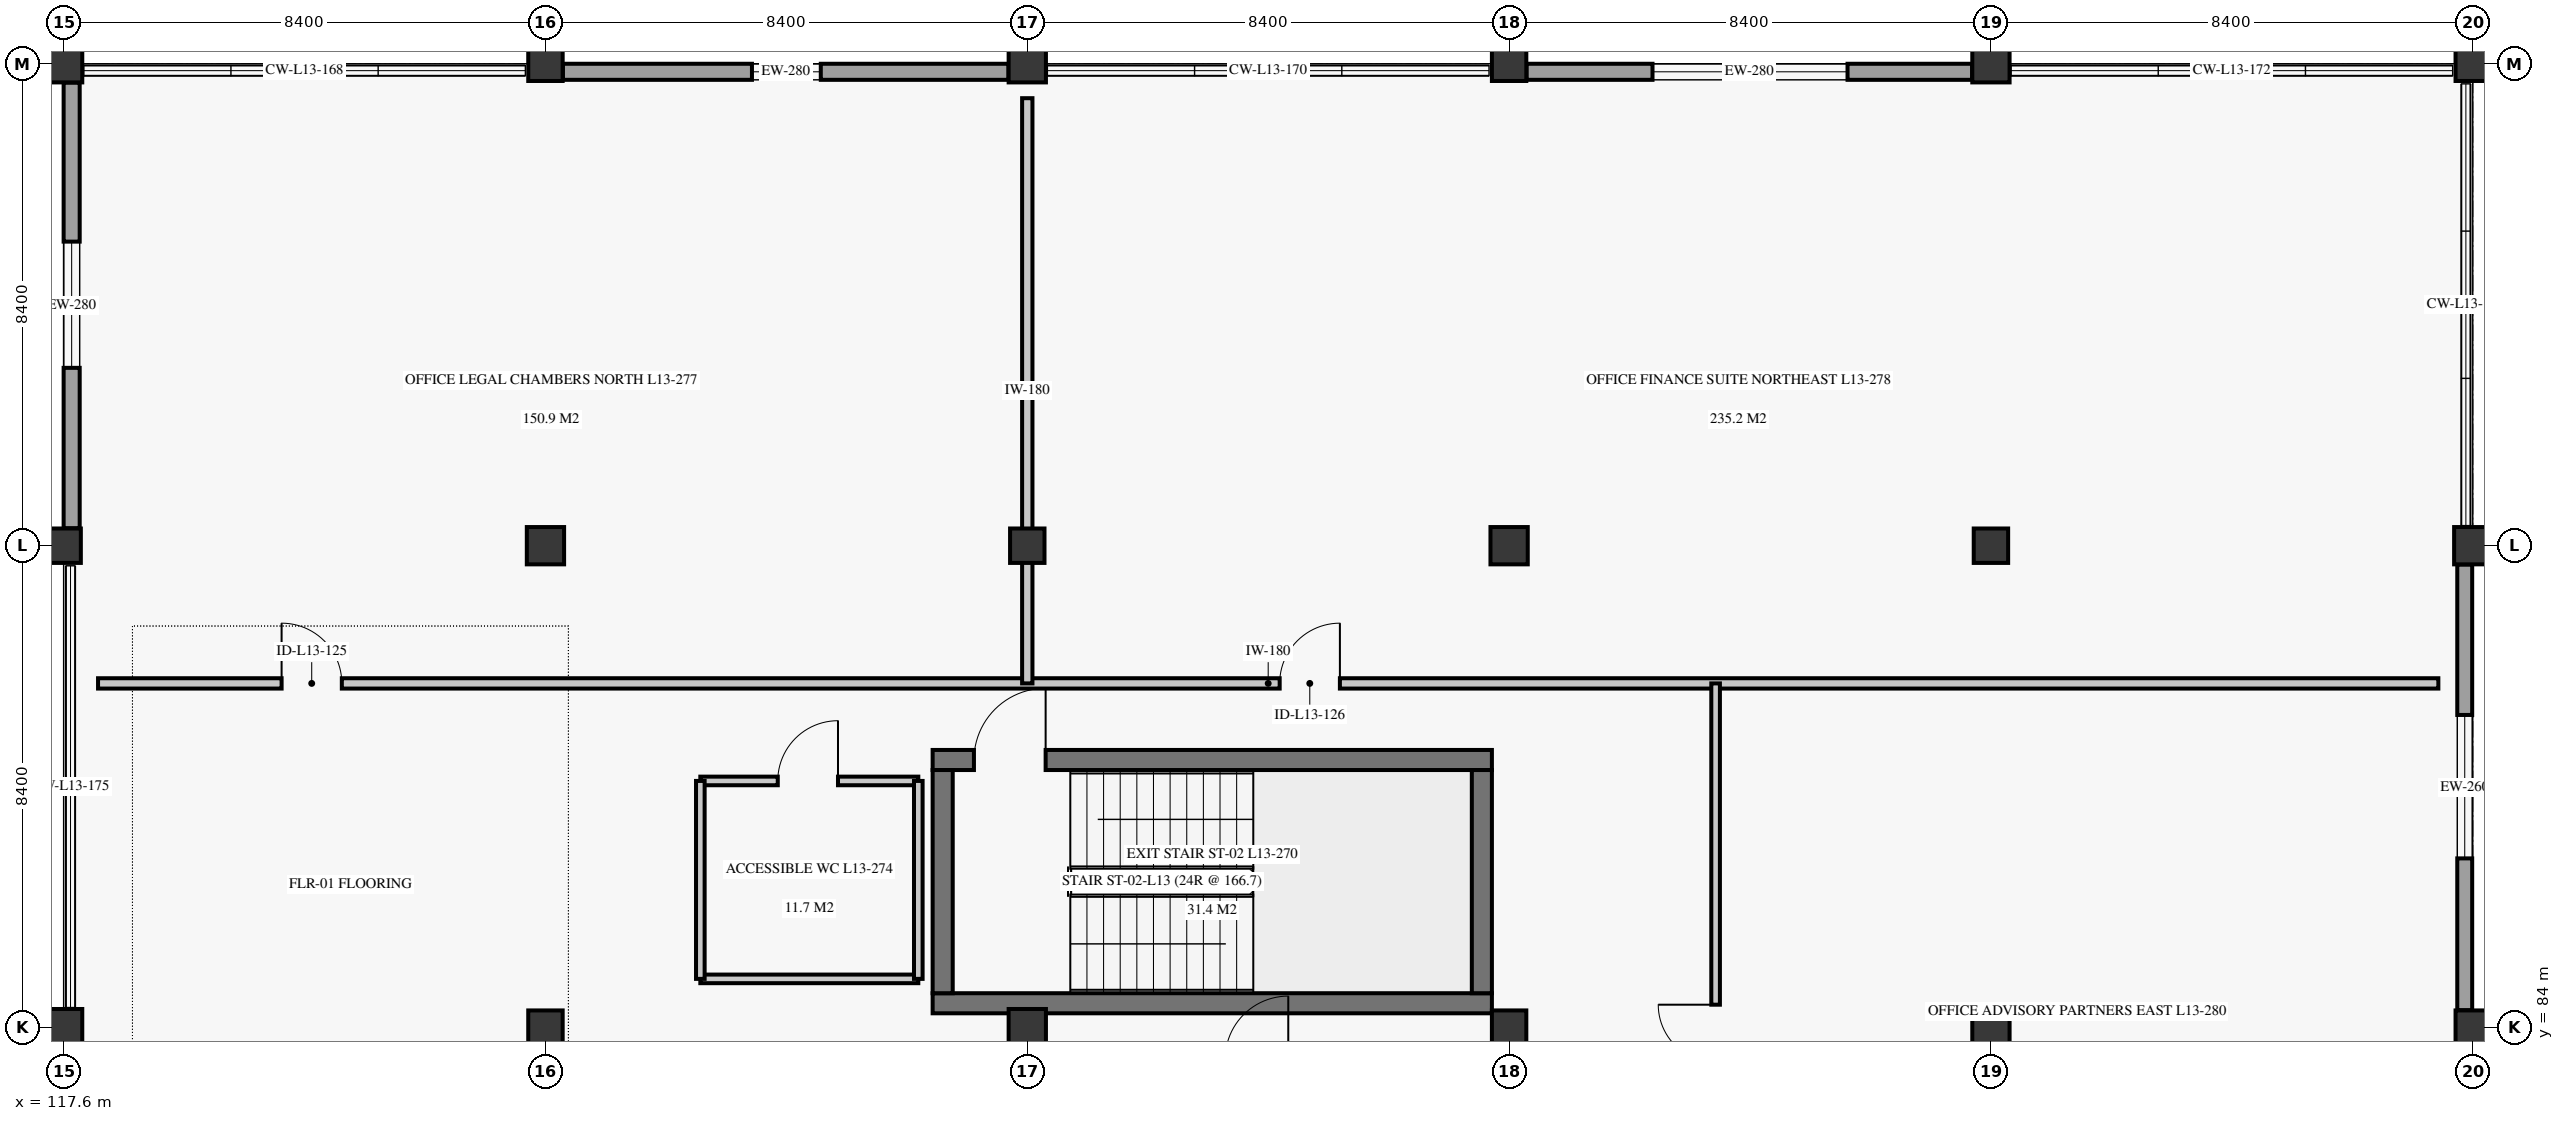
"""IFC4 building model, lengths in metres.
Left out: names, types, materials, properties, quantities, classifications, styles, units other than length and angle.
Written with IfcOpenShell. Run it as: python <this file> out.ifc"""

import sys

from ifc_helpers import new_model, si_unit, direction, frame, frame_2d, origin, origin_2d, place, context, subcontext, project, spatial, rectangle, extrude, element, fill, save


model = new_model("IFC4")
c1 = context("Model", 3, precision=1e-05, world=origin(), true_north=direction((0.0, 1.0)))
c2 = subcontext(c1, "Body", "Model", "MODEL_VIEW")
j1 = project(units=[si_unit("LENGTHUNIT", "METRE"), si_unit("PLANEANGLEUNIT", "RADIAN")], contexts=[c1])
p1 = place(None, origin())
s1 = spatial("IfcSite", under=j1, at=p1, CompositionType="ELEMENT")
p2 = place(p1, origin())
s2 = spatial("IfcBuilding", under=s1, at=p2, CompositionType="ELEMENT")
p3 = place(p2, frame((0.0, 0.0, 54.7)))
s3 = spatial("IfcBuildingStorey", under=s2, at=p3, CompositionType="ELEMENT", Elevation=54.7)
p4 = place(p3, frame((117.6, 84.0, 0.0), z_axis=(0.0, 0.0, 1.0), x_axis=(1.0, 0.0, 0.0)))
e1 = element("IfcColumn", 1, at=p4, inside=s3, PredefinedType="COLUMN", context=c2, shape_type="SweptSolid", body=[
    extrude(rectangle(XDim=0.65, YDim=0.65, at=origin_2d()), origin(), (0.0, 0.0, 1.0), 3.72),
])
p5 = place(p3, frame((117.6, 92.4, 0.0), z_axis=(0.0, 0.0, 1.0), x_axis=(1.0, 0.0, 0.0)))
e2 = element("IfcColumn", 2, at=p5, inside=s3, PredefinedType="COLUMN", context=c2, shape_type="SweptSolid", body=[
    extrude(rectangle(XDim=0.6, YDim=0.6, at=origin_2d()), origin(), (0.0, 0.0, 1.0), 3.72),
])
p6 = place(p3, frame((117.6, 100.8, 0.0), z_axis=(0.0, 0.0, 1.0), x_axis=(1.0, 0.0, 0.0)))
e3 = element("IfcColumn", 3, at=p6, inside=s3, PredefinedType="COLUMN", context=c2, shape_type="SweptSolid", body=[
    extrude(rectangle(XDim=0.65, YDim=0.65, at=origin_2d()), origin(), (0.0, 0.0, 1.0), 3.72),
])
p7 = place(p3, frame((126.0, 84.0, 0.0), z_axis=(0.0, 0.0, 1.0), x_axis=(1.0, 0.0, 0.0)))
e4 = element("IfcColumn", 4, at=p7, inside=s3, PredefinedType="COLUMN", context=c2, shape_type="SweptSolid", body=[
    extrude(rectangle(XDim=0.6, YDim=0.6, at=origin_2d()), origin(), (0.0, 0.0, 1.0), 3.72),
])
p8 = place(p3, frame((126.0, 92.4, 0.0), z_axis=(0.0, 0.0, 1.0), x_axis=(1.0, 0.0, 0.0)))
e5 = element("IfcColumn", 5, at=p8, inside=s3, PredefinedType="COLUMN", context=c2, shape_type="SweptSolid", body=[
    extrude(rectangle(XDim=0.65, YDim=0.65, at=origin_2d()), origin(), (0.0, 0.0, 1.0), 3.72),
])
p9 = place(p3, frame((126.0, 100.8, 0.0), z_axis=(0.0, 0.0, 1.0), x_axis=(1.0, 0.0, 0.0)))
e6 = element("IfcColumn", 6, at=p9, inside=s3, PredefinedType="COLUMN", context=c2, shape_type="SweptSolid", body=[
    extrude(rectangle(XDim=0.6, YDim=0.6, at=origin_2d()), origin(), (0.0, 0.0, 1.0), 3.72),
])
p10 = place(p3, frame((134.4, 84.0, 0.0), z_axis=(0.0, 0.0, 1.0), x_axis=(1.0, 0.0, 0.0)))
e7 = element("IfcColumn", 7, at=p10, inside=s3, PredefinedType="COLUMN", context=c2, shape_type="SweptSolid", body=[
    extrude(rectangle(XDim=0.65, YDim=0.65, at=origin_2d()), origin(), (0.0, 0.0, 1.0), 3.72),
])
p11 = place(p3, frame((134.4, 92.4, 0.0), z_axis=(0.0, 0.0, 1.0), x_axis=(1.0, 0.0, 0.0)))
e8 = element("IfcColumn", 8, at=p11, inside=s3, PredefinedType="COLUMN", context=c2, shape_type="SweptSolid", body=[
    extrude(rectangle(XDim=0.6, YDim=0.6, at=origin_2d()), origin(), (0.0, 0.0, 1.0), 3.72),
])
p12 = place(p3, frame((134.4, 100.8, 0.0), z_axis=(0.0, 0.0, 1.0), x_axis=(1.0, 0.0, 0.0)))
e9 = element("IfcColumn", 9, at=p12, inside=s3, PredefinedType="COLUMN", context=c2, shape_type="SweptSolid", body=[
    extrude(rectangle(XDim=0.65, YDim=0.65, at=origin_2d()), origin(), (0.0, 0.0, 1.0), 3.72),
])
p13 = place(p3, frame((142.8, 84.0, 0.0), z_axis=(0.0, 0.0, 1.0), x_axis=(1.0, 0.0, 0.0)))
e10 = element("IfcColumn", 10, at=p13, inside=s3, PredefinedType="COLUMN", context=c2, shape_type="SweptSolid", body=[
    extrude(rectangle(XDim=0.6, YDim=0.6, at=origin_2d()), origin(), (0.0, 0.0, 1.0), 3.72),
])
p14 = place(p3, frame((142.8, 92.4, 0.0), z_axis=(0.0, 0.0, 1.0), x_axis=(1.0, 0.0, 0.0)))
e11 = element("IfcColumn", 11, at=p14, inside=s3, PredefinedType="COLUMN", context=c2, shape_type="SweptSolid", body=[
    extrude(rectangle(XDim=0.65, YDim=0.65, at=origin_2d()), origin(), (0.0, 0.0, 1.0), 3.72),
])
p15 = place(p3, frame((142.8, 100.8, 0.0), z_axis=(0.0, 0.0, 1.0), x_axis=(1.0, 0.0, 0.0)))
e12 = element("IfcColumn", 12, at=p15, inside=s3, PredefinedType="COLUMN", context=c2, shape_type="SweptSolid", body=[
    extrude(rectangle(XDim=0.6, YDim=0.6, at=origin_2d()), origin(), (0.0, 0.0, 1.0), 3.72),
])
p16 = place(p3, frame((151.2, 84.0, 0.0), z_axis=(0.0, 0.0, 1.0), x_axis=(1.0, 0.0, 0.0)))
e13 = element("IfcColumn", 13, at=p16, inside=s3, PredefinedType="COLUMN", context=c2, shape_type="SweptSolid", body=[
    extrude(rectangle(XDim=0.65, YDim=0.65, at=origin_2d()), origin(), (0.0, 0.0, 1.0), 3.72),
])
p17 = place(p3, frame((151.2, 92.4, 0.0), z_axis=(0.0, 0.0, 1.0), x_axis=(1.0, 0.0, 0.0)))
e14 = element("IfcColumn", 14, at=p17, inside=s3, PredefinedType="COLUMN", context=c2, shape_type="SweptSolid", body=[
    extrude(rectangle(XDim=0.6, YDim=0.6, at=origin_2d()), origin(), (0.0, 0.0, 1.0), 3.72),
])
p18 = place(p3, frame((151.2, 100.8, 0.0), z_axis=(0.0, 0.0, 1.0), x_axis=(1.0, 0.0, 0.0)))
e15 = element("IfcColumn", 15, at=p18, inside=s3, PredefinedType="COLUMN", context=c2, shape_type="SweptSolid", body=[
    extrude(rectangle(XDim=0.65, YDim=0.65, at=origin_2d()), origin(), (0.0, 0.0, 1.0), 3.72),
])
p19 = place(p3, frame((159.6, 84.0, 0.0), z_axis=(0.0, 0.0, 1.0), x_axis=(1.0, 0.0, 0.0)))
e16 = element("IfcColumn", 16, at=p19, inside=s3, PredefinedType="COLUMN", context=c2, shape_type="SweptSolid", body=[
    extrude(rectangle(XDim=0.6, YDim=0.6, at=origin_2d()), origin(), (0.0, 0.0, 1.0), 3.72),
])
p20 = place(p3, frame((159.6, 92.4, 0.0), z_axis=(0.0, 0.0, 1.0), x_axis=(1.0, 0.0, 0.0)))
e17 = element("IfcColumn", 17, at=p20, inside=s3, PredefinedType="COLUMN", context=c2, shape_type="SweptSolid", body=[
    extrude(rectangle(XDim=0.65, YDim=0.65, at=origin_2d()), origin(), (0.0, 0.0, 1.0), 3.72),
])
p21 = place(p3, frame((159.6, 100.8, 0.0), z_axis=(0.0, 0.0, 1.0), x_axis=(1.0, 0.0, 0.0)))
e18 = element("IfcColumn", 18, at=p21, inside=s3, PredefinedType="COLUMN", context=c2, shape_type="SweptSolid", body=[
    extrude(rectangle(XDim=0.6, YDim=0.6, at=origin_2d()), origin(), (0.0, 0.0, 1.0), 3.72),
])
p22 = place(p3, frame((126.304, 100.66, 0.0), z_axis=(0.0, 0.0, 1.0), x_axis=(1.0, 0.0, 0.0)))
e19 = element("IfcWall", 19, at=p22, inside=s3, PredefinedType="SOLIDWALL", context=c2, shape_type="SweptSolid", body=[
    extrude(rectangle(XDim=7.768, YDim=0.28, at=frame_2d((3.884, 0.0))), origin(), (0.0, 0.0, 1.0), 3.04),
])
p23 = place(p22, frame((3.296, 0.0, 0.85)))
e20 = element("IfcOpeningElement", 20, at=p23, cuts=e19, PredefinedType="OPENING", context=c2, shape_type="SweptSolid", body=[
    extrude(rectangle(XDim=1.2, YDim=1.6, at=frame_2d((0.6, 0.8))), frame((0.0, 0.15, 0.0), z_axis=(0.0, -1.0, 0.0), x_axis=(1.0, 0.0, 0.0)), (0.0, 0.0, 1.0), 0.3),
])
p24 = place(p3, frame((143.104, 100.66, 0.0), z_axis=(0.0, 0.0, 1.0), x_axis=(1.0, 0.0, 0.0)))
e21 = element("IfcWall", 21, at=p24, inside=s3, PredefinedType="SOLIDWALL", context=c2, shape_type="SweptSolid", body=[
    extrude(rectangle(XDim=7.768, YDim=0.28, at=frame_2d((3.884, 0.0))), origin(), (0.0, 0.0, 1.0), 3.04),
])
p25 = place(p24, frame((2.196, 0.0, 0.85)))
e22 = element("IfcOpeningElement", 22, at=p25, cuts=e21, PredefinedType="OPENING", context=c2, shape_type="SweptSolid", body=[
    extrude(rectangle(XDim=3.4, YDim=1.9, at=frame_2d((1.7, 0.95))), frame((0.0, 0.15, 0.0), z_axis=(0.0, -1.0, 0.0), x_axis=(1.0, 0.0, 0.0)), (0.0, 0.0, 1.0), 0.3),
])
p26 = place(p3, frame((159.46, 84.304, 0.0), z_axis=(0.0, 0.0, 1.0), x_axis=(0.0, 1.0, 0.0)))
e23 = element("IfcWall", 23, at=p26, inside=s3, PredefinedType="SOLIDWALL", context=c2, shape_type="SweptSolid", body=[
    extrude(rectangle(XDim=7.768, YDim=0.26, at=frame_2d((3.884, 0.0))), origin(), (0.0, 0.0, 1.0), 3.04),
])
p27 = place(p26, frame((2.646, 0.0, 0.85)))
e24 = element("IfcOpeningElement", 24, at=p27, cuts=e23, PredefinedType="OPENING", context=c2, shape_type="SweptSolid", body=[
    extrude(rectangle(XDim=2.5, YDim=1.8, at=frame_2d((1.25, 0.9))), frame((0.0, 0.14, 0.0), z_axis=(0.0, -1.0, 0.0), x_axis=(1.0, 0.0, 0.0)), (0.0, 0.0, 1.0), 0.28),
])
p28 = place(p3, frame((117.74, 92.704, 0.0), z_axis=(0.0, 0.0, 1.0), x_axis=(0.0, 1.0, 0.0)))
e25 = element("IfcWall", 25, at=p28, inside=s3, PredefinedType="SOLIDWALL", context=c2, shape_type="SweptSolid", body=[
    extrude(rectangle(XDim=7.768, YDim=0.28, at=frame_2d((3.884, 0.0))), origin(), (0.0, 0.0, 1.0), 3.04),
])
p29 = place(p28, frame((2.796, 0.0, 0.85)))
e26 = element("IfcOpeningElement", 26, at=p29, cuts=e25, PredefinedType="OPENING", context=c2, shape_type="SweptSolid", body=[
    extrude(rectangle(XDim=2.2, YDim=1.8, at=frame_2d((1.1, 0.9))), frame((0.0, 0.15, 0.0), z_axis=(0.0, -1.0, 0.0), x_axis=(1.0, 0.0, 0.0)), (0.0, 0.0, 1.0), 0.3),
])
p30 = place(p3, frame((132.75, 84.425, 0.0), z_axis=(0.0, 0.0, 1.0), x_axis=(1.0, 0.0, 0.0)))
e27 = element("IfcWall", 27, at=p30, inside=s3, PredefinedType="SHEAR", context=c2, shape_type="SweptSolid", body=[
    extrude(rectangle(XDim=9.75, YDim=0.35, at=frame_2d((4.875, 0.0))), origin(), (0.0, 0.0, 1.0), 3.72),
])
p31 = place(p3, frame((132.75, 88.665, 0.0), z_axis=(0.0, 0.0, 1.0), x_axis=(1.0, 0.0, 0.0)))
e28 = element("IfcWall", 28, at=p31, inside=s3, PredefinedType="SHEAR", context=c2, shape_type="SweptSolid", body=[
    extrude(rectangle(XDim=9.75, YDim=0.35, at=frame_2d((4.875, 0.0))), origin(), (0.0, 0.0, 1.0), 3.72),
])
p32 = place(p31, frame((0.72, 0.0, 0.0)))
e29 = element("IfcOpeningElement", 29, at=p32, cuts=e28, PredefinedType="OPENING", context=c2, shape_type="SweptSolid", body=[
    extrude(rectangle(XDim=1.25, YDim=2.2, at=frame_2d((0.625, 1.1))), frame((0.0, 0.185, 0.0), z_axis=(0.0, -1.0, 0.0), x_axis=(1.0, 0.0, 0.0)), (0.0, 0.0, 1.0), 0.37),
])
for number, where, z_axis, x_axis in (
    (30, (132.925, 84.6, 0.0), (0.0, 0.0, 1.0), (0.0, 1.0, 0.0)),
    (31, (142.325, 84.6, 0.0), (0.0, 0.0, 1.0), (0.0, 1.0, 0.0)),
):
    element("IfcWall", number, at=place(p3, frame(where, z_axis=z_axis, x_axis=x_axis)), inside=s3, PredefinedType="SHEAR", context=c2, shape_type="SweptSolid", body=[
        extrude(rectangle(XDim=3.89, YDim=0.35, at=frame_2d((1.945, 0.0))), origin(), (0.0, 0.0, 1.0), 3.72),
    ])
p33 = place(p3, frame((128.7, 88.3, 0.0), z_axis=(0.0, 0.0, 1.0), x_axis=(1.0, 0.0, 0.0)))
e32 = element("IfcWall", 32, at=p33, inside=s3, PredefinedType="PARTITIONING", context=c2, shape_type="SweptSolid", body=[
    extrude(rectangle(XDim=3.8, YDim=0.15, at=frame_2d((1.9, 0.0))), origin(), (0.0, 0.0, 1.0), 3.34),
])
p34 = place(p33, frame((1.35, 0.0, 0.0)))
e33 = element("IfcOpeningElement", 33, at=p34, cuts=e32, PredefinedType="OPENING", context=c2, shape_type="SweptSolid", body=[
    extrude(rectangle(XDim=1.05, YDim=2.15, at=frame_2d((0.525, 1.075))), frame((0.0, 0.085, 0.0), z_axis=(0.0, -1.0, 0.0), x_axis=(1.0, 0.0, 0.0)), (0.0, 0.0, 1.0), 0.17),
])
p35 = place(p3, frame((128.7, 84.85, 0.0), z_axis=(0.0, 0.0, 1.0), x_axis=(1.0, 0.0, 0.0)))
e34 = element("IfcWall", 34, at=p35, inside=s3, PredefinedType="PARTITIONING", context=c2, shape_type="SweptSolid", body=[
    extrude(rectangle(XDim=3.8, YDim=0.15, at=frame_2d((1.9, 0.0))), origin(), (0.0, 0.0, 1.0), 3.34),
])
for number, where, z_axis, x_axis in (
    (35, (128.7, 84.85, 0.0), (0.0, 0.0, 1.0), (0.0, 1.0, 0.0)),
    (36, (132.5, 84.85, 0.0), (0.0, 0.0, 1.0), (0.0, 1.0, 0.0)),
):
    element("IfcWall", number, at=place(p3, frame(where, z_axis=z_axis, x_axis=x_axis)), inside=s3, PredefinedType="PARTITIONING", context=c2, shape_type="SweptSolid", body=[
        extrude(rectangle(XDim=3.45, YDim=0.15, at=frame_2d((1.725, 0.0))), origin(), (0.0, 0.0, 1.0), 3.34),
    ])
p36 = place(p3, frame((118.2, 90.0, 0.0), z_axis=(0.0, 0.0, 1.0), x_axis=(1.0, 0.0, 0.0)))
e37 = element("IfcWall", 37, at=p36, inside=s3, PredefinedType="PARTITIONING", context=c2, shape_type="SweptSolid", body=[
    extrude(rectangle(XDim=40.8, YDim=0.18, at=frame_2d((20.4, 0.0))), origin(), (0.0, 0.0, 1.0), 3.34),
])
p37 = place(p36, frame((3.2, 0.0, 0.0)))
e38 = element("IfcOpeningElement", 38, at=p37, cuts=e37, PredefinedType="OPENING", context=c2, shape_type="SweptSolid", body=[
    extrude(rectangle(XDim=1.05, YDim=2.2, at=frame_2d((0.525, 1.1))), frame((0.0, 0.1, 0.0), z_axis=(0.0, -1.0, 0.0), x_axis=(1.0, 0.0, 0.0)), (0.0, 0.0, 1.0), 0.2),
])
p38 = place(p36, frame((20.6, 0.0, 0.0)))
e39 = element("IfcOpeningElement", 39, at=p38, cuts=e37, PredefinedType="OPENING", context=c2, shape_type="SweptSolid", body=[
    extrude(rectangle(XDim=1.05, YDim=2.2, at=frame_2d((0.525, 1.1))), frame((0.0, 0.1, 0.0), z_axis=(0.0, -1.0, 0.0), x_axis=(1.0, 0.0, 0.0)), (0.0, 0.0, 1.0), 0.2),
])
p39 = place(p3, frame((134.4, 90.0, 0.0), z_axis=(0.0, 0.0, 1.0), x_axis=(0.0, 1.0, 0.0)))
e40 = element("IfcWall", 40, at=p39, inside=s3, PredefinedType="PARTITIONING", context=c2, shape_type="SweptSolid", body=[
    extrude(rectangle(XDim=10.2, YDim=0.18, at=frame_2d((5.1, 0.0))), origin(), (0.0, 0.0, 1.0), 3.34),
])
p40 = place(p3, frame((146.4, 67.8, 0.0), z_axis=(0.0, 0.0, 1.0), x_axis=(0.0, 1.0, 0.0)))
e41 = element("IfcWall", 41, at=p40, inside=s3, PredefinedType="PARTITIONING", context=c2, shape_type="SweptSolid", body=[
    extrude(rectangle(XDim=22.2, YDim=0.15, at=frame_2d((11.1, 0.0))), origin(), (0.0, 0.0, 1.0), 3.34),
])
p41 = place(p40, frame((4.2, 0.0, 0.0)))
e42 = element("IfcOpeningElement", 42, at=p41, cuts=e41, PredefinedType="OPENING", context=c2, shape_type="SweptSolid", body=[
    extrude(rectangle(XDim=1.0, YDim=2.1, at=frame_2d((0.5, 1.05))), frame((0.0, 0.085, 0.0), z_axis=(0.0, -1.0, 0.0), x_axis=(1.0, 0.0, 0.0)), (0.0, 0.0, 1.0), 0.17),
])
p42 = place(p40, frame((15.6, 0.0, 0.0)))
e43 = element("IfcOpeningElement", 43, at=p42, cuts=e41, PredefinedType="OPENING", context=c2, shape_type="SweptSolid", body=[
    extrude(rectangle(XDim=1.0, YDim=2.1, at=frame_2d((0.5, 1.05))), frame((0.0, 0.085, 0.0), z_axis=(0.0, -1.0, 0.0), x_axis=(1.0, 0.0, 0.0)), (0.0, 0.0, 1.0), 0.17),
])
p43 = place(p23, origin())
e44 = element("IfcWindow", 44, at=p43, inside=s3, PartitioningType="SINGLE_PANEL", PredefinedType="WINDOW", context=c2, shape_type="SweptSolid", body=[
    extrude(rectangle(XDim=1.2, YDim=1.6, at=frame_2d((0.6, 0.8))), frame((0.0, 0.03, 0.0), z_axis=(0.0, -1.0, 0.0), x_axis=(1.0, 0.0, 0.0)), (0.0, 0.0, 1.0), 0.06),
])
fill(e20, e44)
p44 = place(p25, origin())
e45 = element("IfcWindow", 45, at=p44, inside=s3, PartitioningType="SINGLE_PANEL", PredefinedType="WINDOW", context=c2, shape_type="SweptSolid", body=[
    extrude(rectangle(XDim=3.4, YDim=1.9, at=frame_2d((1.7, 0.95))), frame((0.0, 0.03, 0.0), z_axis=(0.0, -1.0, 0.0), x_axis=(1.0, 0.0, 0.0)), (0.0, 0.0, 1.0), 0.06),
])
fill(e22, e45)
p45 = place(p27, origin())
e46 = element("IfcWindow", 46, at=p45, inside=s3, PartitioningType="SINGLE_PANEL", PredefinedType="WINDOW", context=c2, shape_type="SweptSolid", body=[
    extrude(rectangle(XDim=2.5, YDim=1.8, at=frame_2d((1.25, 0.9))), frame((0.0, 0.03, 0.0), z_axis=(0.0, -1.0, 0.0), x_axis=(1.0, 0.0, 0.0)), (0.0, 0.0, 1.0), 0.06),
])
fill(e24, e46)
p46 = place(p29, origin())
e47 = element("IfcWindow", 47, at=p46, inside=s3, PartitioningType="SINGLE_PANEL", PredefinedType="WINDOW", context=c2, shape_type="SweptSolid", body=[
    extrude(rectangle(XDim=2.2, YDim=1.8, at=frame_2d((1.1, 0.9))), frame((0.0, 0.03, 0.0), z_axis=(0.0, -1.0, 0.0), x_axis=(1.0, 0.0, 0.0)), (0.0, 0.0, 1.0), 0.06),
])
fill(e26, e47)
p47 = place(p32, origin())
e48 = element("IfcDoor", 48, at=p47, inside=s3, OperationType="SINGLE_SWING_RIGHT", PredefinedType="DOOR", context=c2, shape_type="SweptSolid", body=[
    extrude(rectangle(XDim=1.25, YDim=2.2, at=frame_2d((0.625, 1.1))), frame((0.0, 0.025, 0.0), z_axis=(0.0, -1.0, 0.0), x_axis=(1.0, 0.0, 0.0)), (0.0, 0.0, 1.0), 0.05),
])
fill(e29, e48)
p48 = place(p34, origin())
e49 = element("IfcDoor", 49, at=p48, inside=s3, OperationType="SINGLE_SWING_RIGHT", PredefinedType="DOOR", context=c2, shape_type="SweptSolid", body=[
    extrude(rectangle(XDim=1.05, YDim=2.15, at=frame_2d((0.525, 1.075))), frame((0.0, 0.025, 0.0), z_axis=(0.0, -1.0, 0.0), x_axis=(1.0, 0.0, 0.0)), (0.0, 0.0, 1.0), 0.05),
])
fill(e33, e49)
p49 = place(p37, origin())
e50 = element("IfcDoor", 50, at=p49, inside=s3, OperationType="SINGLE_SWING_LEFT", PredefinedType="DOOR", context=c2, shape_type="SweptSolid", body=[
    extrude(rectangle(XDim=1.05, YDim=2.2, at=frame_2d((0.525, 1.1))), frame((0.0, 0.025, 0.0), z_axis=(0.0, -1.0, 0.0), x_axis=(1.0, 0.0, 0.0)), (0.0, 0.0, 1.0), 0.05),
])
fill(e38, e50)
p50 = place(p38, origin())
e51 = element("IfcDoor", 51, at=p50, inside=s3, OperationType="SINGLE_SWING_RIGHT", PredefinedType="DOOR", context=c2, shape_type="SweptSolid", body=[
    extrude(rectangle(XDim=1.05, YDim=2.2, at=frame_2d((0.525, 1.1))), frame((0.0, 0.025, 0.0), z_axis=(0.0, -1.0, 0.0), x_axis=(1.0, 0.0, 0.0)), (0.0, 0.0, 1.0), 0.05),
])
fill(e39, e51)
p51 = place(p42, origin())
e52 = element("IfcDoor", 52, at=p51, inside=s3, OperationType="SINGLE_SWING_RIGHT", PredefinedType="DOOR", context=c2, shape_type="SweptSolid", body=[
    extrude(rectangle(XDim=1.0, YDim=2.1, at=frame_2d((0.5, 1.05))), frame((0.0, 0.025, 0.0), z_axis=(0.0, -1.0, 0.0), x_axis=(1.0, 0.0, 0.0)), (0.0, 0.0, 1.0), 0.05),
])
fill(e43, e52)
save(model, sys.argv[1])
